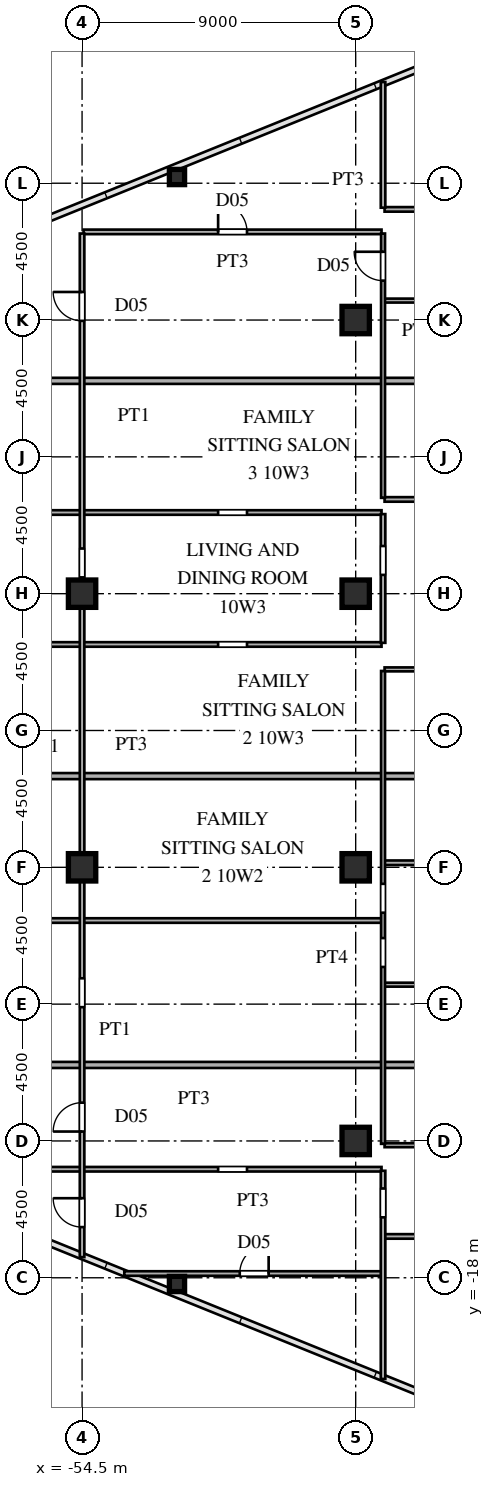
"""IFC4 building model, lengths in metres.
Left out: names, types, materials, properties, quantities, classifications, styles, units other than length and angle.
Written with IfcOpenShell. Run it as: python <this file> out.ifc"""

import sys

from ifc_helpers import new_model, si_unit, direction, frame, frame_2d, origin, origin_2d, place, context, subcontext, project, spatial, rectangle, hollow_rectangle, i_section, extrude, source, transform, mapped, element, fill, save


model = new_model("IFC4")
c1 = context("Model", 3, precision=1e-05, world=origin(), true_north=direction((0.0, 1.0)))
c2 = subcontext(c1, "Body", "Model", "MODEL_VIEW")
j1 = project(units=[si_unit("LENGTHUNIT", "METRE"), si_unit("PLANEANGLEUNIT", "RADIAN")], contexts=[c1])
p1 = place(None, origin())
s1 = spatial("IfcSite", under=j1, at=p1, CompositionType="ELEMENT")
p2 = place(p1, origin())
s2 = spatial("IfcBuilding", under=s1, at=p2, CompositionType="ELEMENT")
p3 = place(p2, frame((0.0, 0.0, 40.5)))
s3 = spatial("IfcBuildingStorey", under=s2, at=p3, CompositionType="ELEMENT", Elevation=40.5)
m1 = source(origin(), c2, "Body", "SweptSolid", [
    extrude(i_section(OverallWidth=0.9, OverallDepth=0.9, WebThickness=0.036, FlangeThickness=0.055, at=origin_2d()), origin(), (0.0, 0.0, 1.0), 3.6),
])
for number, where, z_axis, x_axis in (
    (1, (-45.5, -13.5, 0.0), (0.0, 0.0, 1.0), (1.0, 0.0, 0.0)),
    (2, (-45.5, -4.5, 0.0), (0.0, 0.0, 1.0), (1.0, 0.0, 0.0)),
    (3, (-45.5, 4.5, 0.0), (0.0, 0.0, 1.0), (1.0, 0.0, 0.0)),
    (4, (-45.5, 13.5, 0.0), (0.0, 0.0, 1.0), (1.0, 0.0, 0.0)),
    (5, (-54.5, -4.5, 0.0), (0.0, 0.0, 1.0), (1.0, 0.0, 0.0)),
    (6, (-54.5, 4.5, 0.0), (0.0, 0.0, 1.0), (1.0, 0.0, 0.0)),
):
    element("IfcColumn", number, at=place(p3, frame(where, z_axis=z_axis, x_axis=x_axis)), inside=s3, PredefinedType="COLUMN", context=c2, shape_type="MappedRepresentation", body=[
        mapped(m1, transform((0.0, 0.0, 0.0), scale=1.0)),
    ])
m2 = source(origin(), c2, "Body", "SweptSolid", [
    extrude(hollow_rectangle(XDim=0.5, YDim=0.5, WallThickness=0.02, at=origin_2d()), origin(), (0.0, 0.0, 1.0), 3.6),
])
for number, where, z_axis, x_axis in (
    (7, (-51.378, -18.204, 0.0), (0.0, 0.0, 1.0), (1.0, 0.0, 0.0)),
    (8, (-51.378, 18.204, 0.0), (0.0, 0.0, 1.0), (1.0, 0.0, 0.0)),
):
    element("IfcColumn", number, at=place(p3, frame(where, z_axis=z_axis, x_axis=x_axis)), inside=s3, PredefinedType="COLUMN", context=c2, shape_type="MappedRepresentation", body=[
        mapped(m2, transform((0.0, 0.0, 0.0), scale=1.0)),
    ])
p4 = place(p3, frame((-53.111, -17.86, 0.0), z_axis=(0.0, 0.0, 1.0), x_axis=(1.0, 0.0, 0.0)))
e9 = element("IfcWall", 9, at=p4, inside=s3, PredefinedType="PARTITIONING", context=c2, shape_type="SweptSolid", body=[
    extrude(rectangle(XDim=8.461, YDim=0.15, at=frame_2d((4.23, 0.0))), origin(), (0.0, 0.0, 1.0), 3.38),
])
p5 = place(p4, frame((3.798, 0.0, 0.0)))
e10 = element("IfcOpeningElement", 10, at=p5, cuts=e9, PredefinedType="OPENING", context=c2, shape_type="SweptSolid", body=[
    extrude(rectangle(XDim=0.95, YDim=2.15, at=frame_2d((0.475, 1.075))), frame((0.0, 0.085, 0.0), z_axis=(0.0, -1.0, 0.0), x_axis=(1.0, 0.0, 0.0)), (0.0, 0.0, 1.0), 0.17),
])
p6 = place(p3, frame((-44.55, -16.64, 0.0), z_axis=(0.0, 0.0, 1.0), x_axis=(1.0, 0.0, 0.0)))
e11 = element("IfcWall", 11, at=p6, inside=s3, PredefinedType="PARTITIONING", context=c2, shape_type="SweptSolid", body=[
    extrude(rectangle(XDim=5.55, YDim=0.15, at=frame_2d((2.775, 0.0))), origin(), (0.0, 0.0, 1.0), 3.38),
])
p7 = place(p6, frame((2.3, 0.0, 0.0)))
e12 = element("IfcOpeningElement", 12, at=p7, cuts=e11, PredefinedType="OPENING", context=c2, shape_type="SweptSolid", body=[
    extrude(rectangle(XDim=0.95, YDim=2.15, at=frame_2d((0.475, 1.075))), frame((0.0, 0.085, 0.0), z_axis=(0.0, -1.0, 0.0), x_axis=(1.0, 0.0, 0.0)), (0.0, 0.0, 1.0), 0.17),
])
p8 = place(p3, frame((-61.588, -14.43, 0.0), z_axis=(0.0, 0.0, 1.0), x_axis=(1.0, 0.0, 0.0)))
e13 = element("IfcWall", 13, at=p8, inside=s3, PredefinedType="PARTITIONING", context=c2, shape_type="SweptSolid", body=[
    extrude(rectangle(XDim=16.938, YDim=0.15, at=frame_2d((8.469, 0.0))), origin(), (0.0, 0.0, 1.0), 3.38),
])
p9 = place(p8, frame((11.563, 0.0, 0.0)))
e14 = element("IfcOpeningElement", 14, at=p9, cuts=e13, PredefinedType="OPENING", context=c2, shape_type="SweptSolid", body=[
    extrude(rectangle(XDim=0.95, YDim=2.15, at=frame_2d((0.475, 1.075))), frame((0.0, 0.085, 0.0), z_axis=(0.0, -1.0, 0.0), x_axis=(1.0, 0.0, 0.0)), (0.0, 0.0, 1.0), 0.17),
])
p10 = place(p3, frame((-44.55, -13.64, 0.0), z_axis=(0.0, 0.0, 1.0), x_axis=(1.0, 0.0, 0.0)))
e15 = element("IfcWall", 15, at=p10, inside=s3, PredefinedType="PARTITIONING", context=c2, shape_type="SweptSolid", body=[
    extrude(rectangle(XDim=5.5, YDim=0.13, at=frame_2d((2.75, 0.0))), origin(), (0.0, 0.0, 1.0), 2.68),
])
p11 = place(p10, frame((2.31, 0.0, 0.0)))
e16 = element("IfcOpeningElement", 16, at=p11, cuts=e15, PredefinedType="OPENING", context=c2, shape_type="SweptSolid", body=[
    extrude(rectangle(XDim=0.88, YDim=2.1, at=frame_2d((0.44, 1.05))), frame((0.0, 0.075, 0.0), z_axis=(0.0, -1.0, 0.0), x_axis=(1.0, 0.0, 0.0)), (0.0, 0.0, 1.0), 0.15),
])
p12 = place(p3, frame((-70.043, -11.0, 0.0), z_axis=(0.0, 0.0, 1.0), x_axis=(1.0, 0.0, 0.0)))
e17 = element("IfcWall", 17, at=p12, inside=s3, PredefinedType="PARTITIONING", context=c2, shape_type="SweptSolid", body=[
    extrude(rectangle(XDim=30.963, YDim=0.2, at=frame_2d((15.481, 0.0))), origin(), (0.0, 0.0, 1.0), 3.38),
])
p13 = place(p3, frame((-44.55, -8.36, 0.0), z_axis=(0.0, 0.0, 1.0), x_axis=(1.0, 0.0, 0.0)))
e18 = element("IfcWall", 18, at=p13, inside=s3, PredefinedType="PARTITIONING", context=c2, shape_type="SweptSolid", body=[
    extrude(rectangle(XDim=5.5, YDim=0.13, at=frame_2d((2.75, 0.0))), origin(), (0.0, 0.0, 1.0), 3.38),
])
p14 = place(p13, frame((2.31, 0.0, 0.0)))
e19 = element("IfcOpeningElement", 19, at=p14, cuts=e18, PredefinedType="OPENING", context=c2, shape_type="SweptSolid", body=[
    extrude(rectangle(XDim=0.88, YDim=2.1, at=frame_2d((0.44, 1.05))), frame((0.0, 0.075, 0.0), z_axis=(0.0, -1.0, 0.0), x_axis=(1.0, 0.0, 0.0)), (0.0, 0.0, 1.0), 0.15),
])
p15 = place(p3, frame((-72.535, -6.25, 0.0), z_axis=(0.0, 0.0, 1.0), x_axis=(1.0, 0.0, 0.0)))
e20 = element("IfcWall", 20, at=p15, inside=s3, PredefinedType="PARTITIONING", context=c2, shape_type="SweptSolid", body=[
    extrude(rectangle(XDim=27.885, YDim=0.15, at=frame_2d((13.942, 0.0))), origin(), (0.0, 0.0, 1.0), 3.38),
])
p16 = place(p15, frame((14.71, 0.0, 0.0)))
e21 = element("IfcOpeningElement", 21, at=p16, cuts=e20, PredefinedType="OPENING", context=c2, shape_type="SweptSolid", body=[
    extrude(rectangle(XDim=0.95, YDim=2.15, at=frame_2d((0.475, 1.075))), frame((0.0, 0.085, 0.0), z_axis=(0.0, -1.0, 0.0), x_axis=(1.0, 0.0, 0.0)), (0.0, 0.0, 1.0), 0.17),
])
p17 = place(p3, frame((-44.55, -4.35, 0.0), z_axis=(0.0, 0.0, 1.0), x_axis=(1.0, 0.0, 0.0)))
e22 = element("IfcWall", 22, at=p17, inside=s3, PredefinedType="PARTITIONING", context=c2, shape_type="SweptSolid", body=[
    extrude(rectangle(XDim=5.5, YDim=0.15, at=frame_2d((2.75, 0.0))), origin(), (0.0, 0.0, 1.0), 2.68),
])
p18 = place(p17, frame((2.275, 0.0, 0.0)))
e23 = element("IfcOpeningElement", 23, at=p18, cuts=e22, PredefinedType="OPENING", context=c2, shape_type="SweptSolid", body=[
    extrude(rectangle(XDim=0.95, YDim=2.15, at=frame_2d((0.475, 1.075))), frame((0.0, 0.085, 0.0), z_axis=(0.0, -1.0, 0.0), x_axis=(1.0, 0.0, 0.0)), (0.0, 0.0, 1.0), 0.17),
])
p19 = place(p3, frame((-72.505, -1.5, 0.0), z_axis=(0.0, 0.0, 1.0), x_axis=(1.0, 0.0, 0.0)))
e24 = element("IfcWall", 24, at=p19, inside=s3, PredefinedType="PARTITIONING", context=c2, shape_type="SweptSolid", body=[
    extrude(rectangle(XDim=33.425, YDim=0.2, at=frame_2d((16.712, 0.0))), origin(), (0.0, 0.0, 1.0), 3.38),
])
p20 = place(p3, frame((-44.55, 2.01, 0.0), z_axis=(0.0, 0.0, 1.0), x_axis=(1.0, 0.0, 0.0)))
e25 = element("IfcWall", 25, at=p20, inside=s3, PredefinedType="PARTITIONING", context=c2, shape_type="SweptSolid", body=[
    extrude(rectangle(XDim=5.5, YDim=0.13, at=frame_2d((2.75, 0.0))), origin(), (0.0, 0.0, 1.0), 3.38),
])
p21 = place(p20, frame((2.31, 0.0, 0.0)))
e26 = element("IfcOpeningElement", 26, at=p21, cuts=e25, PredefinedType="OPENING", context=c2, shape_type="SweptSolid", body=[
    extrude(rectangle(XDim=0.88, YDim=2.1, at=frame_2d((0.44, 1.05))), frame((0.0, 0.075, 0.0), z_axis=(0.0, -1.0, 0.0), x_axis=(1.0, 0.0, 0.0)), (0.0, 0.0, 1.0), 0.15),
])
p22 = place(p3, frame((-72.535, 2.83, 0.0), z_axis=(0.0, 0.0, 1.0), x_axis=(1.0, 0.0, 0.0)))
e27 = element("IfcWall", 27, at=p22, inside=s3, PredefinedType="PARTITIONING", context=c2, shape_type="SweptSolid", body=[
    extrude(rectangle(XDim=27.885, YDim=0.15, at=frame_2d((13.942, 0.0))), origin(), (0.0, 0.0, 1.0), 3.38),
])
p23 = place(p22, frame((22.51, 0.0, 0.0)))
e28 = element("IfcOpeningElement", 28, at=p23, cuts=e27, PredefinedType="OPENING", context=c2, shape_type="SweptSolid", body=[
    extrude(rectangle(XDim=0.95, YDim=2.15, at=frame_2d((0.475, 1.075))), frame((0.0, 0.085, 0.0), z_axis=(0.0, -1.0, 0.0), x_axis=(1.0, 0.0, 0.0)), (0.0, 0.0, 1.0), 0.17),
])
p24 = place(p22, frame((14.71, 0.0, 0.0)))
e29 = element("IfcOpeningElement", 29, at=p24, cuts=e27, PredefinedType="OPENING", context=c2, shape_type="SweptSolid", body=[
    extrude(rectangle(XDim=0.95, YDim=2.15, at=frame_2d((0.475, 1.075))), frame((0.0, 0.085, 0.0), z_axis=(0.0, -1.0, 0.0), x_axis=(1.0, 0.0, 0.0)), (0.0, 0.0, 1.0), 0.17),
])
p25 = place(p3, frame((-72.535, 7.17, 0.0), z_axis=(0.0, 0.0, 1.0), x_axis=(1.0, 0.0, 0.0)))
e30 = element("IfcWall", 30, at=p25, inside=s3, PredefinedType="PARTITIONING", context=c2, shape_type="SweptSolid", body=[
    extrude(rectangle(XDim=27.885, YDim=0.15, at=frame_2d((13.942, 0.0))), origin(), (0.0, 0.0, 1.0), 3.38),
])
p26 = place(p25, frame((22.51, 0.0, 0.0)))
e31 = element("IfcOpeningElement", 31, at=p26, cuts=e30, PredefinedType="OPENING", context=c2, shape_type="SweptSolid", body=[
    extrude(rectangle(XDim=0.95, YDim=2.15, at=frame_2d((0.475, 1.075))), frame((0.0, 0.085, 0.0), z_axis=(0.0, -1.0, 0.0), x_axis=(1.0, 0.0, 0.0)), (0.0, 0.0, 1.0), 0.17),
])
p27 = place(p25, frame((14.71, 0.0, 0.0)))
e32 = element("IfcOpeningElement", 32, at=p27, cuts=e30, PredefinedType="OPENING", context=c2, shape_type="SweptSolid", body=[
    extrude(rectangle(XDim=0.95, YDim=2.15, at=frame_2d((0.475, 1.075))), frame((0.0, 0.085, 0.0), z_axis=(0.0, -1.0, 0.0), x_axis=(1.0, 0.0, 0.0)), (0.0, 0.0, 1.0), 0.17),
])
p28 = place(p3, frame((-44.55, 7.6, 0.0), z_axis=(0.0, 0.0, 1.0), x_axis=(1.0, 0.0, 0.0)))
e33 = element("IfcWall", 33, at=p28, inside=s3, PredefinedType="PARTITIONING", context=c2, shape_type="SweptSolid", body=[
    extrude(rectangle(XDim=5.5, YDim=0.15, at=frame_2d((2.75, 0.0))), origin(), (0.0, 0.0, 1.0), 3.38),
])
p29 = place(p28, frame((2.275, 0.0, 0.0)))
e34 = element("IfcOpeningElement", 34, at=p29, cuts=e33, PredefinedType="OPENING", context=c2, shape_type="SweptSolid", body=[
    extrude(rectangle(XDim=0.95, YDim=2.15, at=frame_2d((0.475, 1.075))), frame((0.0, 0.085, 0.0), z_axis=(0.0, -1.0, 0.0), x_axis=(1.0, 0.0, 0.0)), (0.0, 0.0, 1.0), 0.17),
])
p30 = place(p3, frame((-68.807, 11.5, 0.0), z_axis=(0.0, 0.0, 1.0), x_axis=(1.0, 0.0, 0.0)))
e35 = element("IfcWall", 35, at=p30, inside=s3, PredefinedType="PARTITIONING", context=c2, shape_type="SweptSolid", body=[
    extrude(rectangle(XDim=29.727, YDim=0.2, at=frame_2d((14.863, 0.0))), origin(), (0.0, 0.0, 1.0), 3.38),
])
p31 = place(p3, frame((-44.55, 14.14, 0.0), z_axis=(0.0, 0.0, 1.0), x_axis=(1.0, 0.0, 0.0)))
e36 = element("IfcWall", 36, at=p31, inside=s3, PredefinedType="PARTITIONING", context=c2, shape_type="SweptSolid", body=[
    extrude(rectangle(XDim=5.5, YDim=0.13, at=frame_2d((2.75, 0.0))), origin(), (0.0, 0.0, 1.0), 3.38),
])
p32 = place(p31, frame((2.31, 0.0, 0.0)))
e37 = element("IfcOpeningElement", 37, at=p32, cuts=e36, PredefinedType="OPENING", context=c2, shape_type="SweptSolid", body=[
    extrude(rectangle(XDim=0.88, YDim=2.1, at=frame_2d((0.44, 1.05))), frame((0.0, 0.075, 0.0), z_axis=(0.0, -1.0, 0.0), x_axis=(1.0, 0.0, 0.0)), (0.0, 0.0, 1.0), 0.15),
])
p33 = place(p3, frame((-54.45, 16.4, 0.0), z_axis=(0.0, 0.0, 1.0), x_axis=(1.0, 0.0, 0.0)))
e38 = element("IfcWall", 38, at=p33, inside=s3, PredefinedType="PARTITIONING", context=c2, shape_type="SweptSolid", body=[
    extrude(rectangle(XDim=9.8, YDim=0.15, at=frame_2d((4.9, 0.0))), origin(), (0.0, 0.0, 1.0), 3.38),
])
p34 = place(p33, frame((4.425, 0.0, 0.0)))
e39 = element("IfcOpeningElement", 39, at=p34, cuts=e38, PredefinedType="OPENING", context=c2, shape_type="SweptSolid", body=[
    extrude(rectangle(XDim=0.95, YDim=2.15, at=frame_2d((0.475, 1.075))), frame((0.0, 0.085, 0.0), z_axis=(0.0, -1.0, 0.0), x_axis=(1.0, 0.0, 0.0)), (0.0, 0.0, 1.0), 0.17),
])
p35 = place(p3, frame((-44.55, 17.14, 0.0), z_axis=(0.0, 0.0, 1.0), x_axis=(1.0, 0.0, 0.0)))
e40 = element("IfcWall", 40, at=p35, inside=s3, PredefinedType="PARTITIONING", context=c2, shape_type="SweptSolid", body=[
    extrude(rectangle(XDim=5.55, YDim=0.15, at=frame_2d((2.775, 0.0))), origin(), (0.0, 0.0, 1.0), 3.38),
])
p36 = place(p35, frame((2.3, 0.0, 0.0)))
e41 = element("IfcOpeningElement", 41, at=p36, cuts=e40, PredefinedType="OPENING", context=c2, shape_type="SweptSolid", body=[
    extrude(rectangle(XDim=0.95, YDim=2.15, at=frame_2d((0.475, 1.075))), frame((0.0, 0.085, 0.0), z_axis=(0.0, -1.0, 0.0), x_axis=(1.0, 0.0, 0.0)), (0.0, 0.0, 1.0), 0.17),
])
p37 = place(p3, frame((-54.5, -17.321, 0.0), z_axis=(0.0, 0.0, 1.0), x_axis=(0.0, 1.0, 0.0)))
e42 = element("IfcWall", 42, at=p37, inside=s3, PredefinedType="PARTITIONING", context=c2, shape_type="SweptSolid", body=[
    extrude(rectangle(XDim=33.667, YDim=0.15, at=frame_2d((16.833, 0.0))), origin(), (0.0, 0.0, 1.0), 2.68),
])
p38 = place(p37, frame((0.988, 0.0, 0.0)))
e43 = element("IfcOpeningElement", 43, at=p38, cuts=e42, PredefinedType="OPENING", context=c2, shape_type="SweptSolid", body=[
    extrude(rectangle(XDim=0.95, YDim=2.15, at=frame_2d((0.475, 1.075))), frame((0.0, 0.085, 0.0), z_axis=(0.0, -1.0, 0.0), x_axis=(1.0, 0.0, 0.0)), (0.0, 0.0, 1.0), 0.17),
])
p39 = place(p37, frame((4.131, 0.0, 0.0)))
e44 = element("IfcOpeningElement", 44, at=p39, cuts=e42, PredefinedType="OPENING", context=c2, shape_type="SweptSolid", body=[
    extrude(rectangle(XDim=0.95, YDim=2.15, at=frame_2d((0.475, 1.075))), frame((0.0, 0.085, 0.0), z_axis=(0.0, -1.0, 0.0), x_axis=(1.0, 0.0, 0.0)), (0.0, 0.0, 1.0), 0.17),
])
p40 = place(p37, frame((8.221, 0.0, 0.0)))
e45 = element("IfcOpeningElement", 45, at=p40, cuts=e42, PredefinedType="OPENING", context=c2, shape_type="SweptSolid", body=[
    extrude(rectangle(XDim=0.95, YDim=2.15, at=frame_2d((0.475, 1.075))), frame((0.0, 0.085, 0.0), z_axis=(0.0, -1.0, 0.0), x_axis=(1.0, 0.0, 0.0)), (0.0, 0.0, 1.0), 0.17),
])
p41 = place(p37, frame((22.357, 0.0, 0.0)))
e46 = element("IfcOpeningElement", 46, at=p41, cuts=e42, PredefinedType="OPENING", context=c2, shape_type="SweptSolid", body=[
    extrude(rectangle(XDim=0.95, YDim=2.15, at=frame_2d((0.475, 1.075))), frame((0.0, 0.085, 0.0), z_axis=(0.0, -1.0, 0.0), x_axis=(1.0, 0.0, 0.0)), (0.0, 0.0, 1.0), 0.17),
])
p42 = place(p37, frame((30.794, 0.0, 0.0)))
e47 = element("IfcOpeningElement", 47, at=p42, cuts=e42, PredefinedType="OPENING", context=c2, shape_type="SweptSolid", body=[
    extrude(rectangle(XDim=0.95, YDim=2.15, at=frame_2d((0.475, 1.075))), frame((0.0, 0.085, 0.0), z_axis=(0.0, -1.0, 0.0), x_axis=(1.0, 0.0, 0.0)), (0.0, 0.0, 1.0), 0.17),
])
p43 = place(p3, frame((-44.6, -21.328, 0.0), z_axis=(0.0, 0.0, 1.0), x_axis=(0.0, 1.0, 0.0)))
e48 = element("IfcWall", 48, at=p43, inside=s3, PredefinedType="PARTITIONING", context=c2, shape_type="SweptSolid", body=[
    extrude(rectangle(XDim=6.847, YDim=0.15, at=frame_2d((3.423, 0.0))), origin(), (0.0, 0.0, 1.0), 3.38),
])
p44 = place(p43, frame((5.315, 0.0, 0.0)))
e49 = element("IfcOpeningElement", 49, at=p44, cuts=e48, PredefinedType="OPENING", context=c2, shape_type="SweptSolid", body=[
    extrude(rectangle(XDim=0.95, YDim=2.15, at=frame_2d((0.475, 1.075))), frame((0.0, 0.085, 0.0), z_axis=(0.0, -1.0, 0.0), x_axis=(1.0, 0.0, 0.0)), (0.0, 0.0, 1.0), 0.17),
])
p45 = place(p3, frame((-44.6, -13.595, 0.0), z_axis=(0.0, 0.0, 1.0), x_axis=(0.0, 1.0, 0.0)))
e50 = element("IfcWall", 50, at=p45, inside=s3, PredefinedType="PARTITIONING", context=c2, shape_type="SweptSolid", body=[
    extrude(rectangle(XDim=15.553, YDim=0.13, at=frame_2d((7.776, 0.0))), origin(), (0.0, 0.0, 1.0), 3.38),
])
p46 = place(p45, frame((5.817, 0.0, 0.0)))
e51 = element("IfcOpeningElement", 51, at=p46, cuts=e50, PredefinedType="OPENING", context=c2, shape_type="SweptSolid", body=[
    extrude(rectangle(XDim=0.95, YDim=2.15, at=frame_2d((0.475, 1.075))), frame((0.0, 0.075, 0.0), z_axis=(0.0, -1.0, 0.0), x_axis=(1.0, 0.0, 0.0)), (0.0, 0.0, 1.0), 0.15),
])
p47 = place(p45, frame((7.602, 0.0, 0.0)))
e52 = element("IfcOpeningElement", 52, at=p47, cuts=e50, PredefinedType="OPENING", context=c2, shape_type="SweptSolid", body=[
    extrude(rectangle(XDim=0.95, YDim=2.15, at=frame_2d((0.475, 1.075))), frame((0.0, 0.075, 0.0), z_axis=(0.0, -1.0, 0.0), x_axis=(1.0, 0.0, 0.0)), (0.0, 0.0, 1.0), 0.15),
])
p48 = place(p3, frame((-44.6, 2.883, 0.0), z_axis=(0.0, 0.0, 1.0), x_axis=(0.0, 1.0, 0.0)))
e53 = element("IfcWall", 53, at=p48, inside=s3, PredefinedType="PARTITIONING", context=c2, shape_type="SweptSolid", body=[
    extrude(rectangle(XDim=4.234, YDim=0.15, at=frame_2d((2.117, 0.0))), origin(), (0.0, 0.0, 1.0), 3.38),
])
p49 = place(p48, frame((2.235, 0.0, 0.0)))
e54 = element("IfcOpeningElement", 54, at=p49, cuts=e53, PredefinedType="OPENING", context=c2, shape_type="SweptSolid", body=[
    extrude(rectangle(XDim=0.95, YDim=2.15, at=frame_2d((0.475, 1.075))), frame((0.0, 0.085, 0.0), z_axis=(0.0, -1.0, 0.0), x_axis=(1.0, 0.0, 0.0)), (0.0, 0.0, 1.0), 0.17),
])
p50 = place(p3, frame((-44.6, 7.652, 0.0), z_axis=(0.0, 0.0, 1.0), x_axis=(0.0, 1.0, 0.0)))
e55 = element("IfcWall", 55, at=p50, inside=s3, PredefinedType="PARTITIONING", context=c2, shape_type="SweptSolid", body=[
    extrude(rectangle(XDim=8.694, YDim=0.13, at=frame_2d((4.347, 0.0))), origin(), (0.0, 0.0, 1.0), 3.38),
])
p51 = place(p50, frame((7.144, 0.0, 0.0)))
e56 = element("IfcOpeningElement", 56, at=p51, cuts=e55, PredefinedType="OPENING", context=c2, shape_type="SweptSolid", body=[
    extrude(rectangle(XDim=0.95, YDim=2.15, at=frame_2d((0.475, 1.075))), frame((0.0, 0.075, 0.0), z_axis=(0.0, -1.0, 0.0), x_axis=(1.0, 0.0, 0.0)), (0.0, 0.0, 1.0), 0.15),
])
p52 = place(p3, frame((-44.6, 17.195, 0.0), z_axis=(0.0, 0.0, 1.0), x_axis=(0.0, 1.0, 0.0)))
e57 = element("IfcWall", 57, at=p52, inside=s3, PredefinedType="PARTITIONING", context=c2, shape_type="SweptSolid", body=[
    extrude(rectangle(XDim=4.133, YDim=0.15, at=frame_2d((2.066, 0.0))), origin(), (0.0, 0.0, 1.0), 3.38),
])
m3 = source(origin(), c2, "Body", "SweptSolid", [
    extrude(rectangle(XDim=0.95, YDim=2.15, at=frame_2d((0.475, 1.075))), frame((0.0, 0.025, 0.0), z_axis=(0.0, -1.0, 0.0), x_axis=(1.0, 0.0, 0.0)), (0.0, 0.0, 1.0), 0.05),
])
p53 = place(p5, origin())
e58 = element("IfcDoor", 58, at=p53, inside=s3, OperationType="SINGLE_SWING_RIGHT", PredefinedType="DOOR", context=c2, shape_type="MappedRepresentation", body=[
    mapped(m3, transform((0.0, 0.0, 0.0), scale=1.0)),
])
fill(e10, e58)
p54 = place(p34, origin())
e59 = element("IfcDoor", 59, at=p54, inside=s3, OperationType="SINGLE_SWING_LEFT", PredefinedType="DOOR", context=c2, shape_type="MappedRepresentation", body=[
    mapped(m3, transform((0.0, 0.0, 0.0), scale=1.0)),
])
fill(e39, e59)
p55 = place(p38, origin())
e60 = element("IfcDoor", 60, at=p55, inside=s3, OperationType="SINGLE_SWING_RIGHT", PredefinedType="DOOR", context=c2, shape_type="MappedRepresentation", body=[
    mapped(m3, transform((0.0, 0.0, 0.0), scale=1.0)),
])
fill(e43, e60)
p56 = place(p39, origin())
e61 = element("IfcDoor", 61, at=p56, inside=s3, OperationType="SINGLE_SWING_LEFT", PredefinedType="DOOR", context=c2, shape_type="MappedRepresentation", body=[
    mapped(m3, transform((0.0, 0.0, 0.0), scale=1.0)),
])
fill(e44, e61)
p57 = place(p42, origin())
e62 = element("IfcDoor", 62, at=p57, inside=s3, OperationType="SINGLE_SWING_RIGHT", PredefinedType="DOOR", context=c2, shape_type="MappedRepresentation", body=[
    mapped(m3, transform((0.0, 0.0, 0.0), scale=1.0)),
])
fill(e47, e62)
p58 = place(p51, origin())
e63 = element("IfcDoor", 63, at=p58, inside=s3, OperationType="SINGLE_SWING_RIGHT", PredefinedType="DOOR", context=c2, shape_type="MappedRepresentation", body=[
    mapped(m3, transform((0.0, 0.0, 0.0), scale=1.0)),
])
fill(e56, e63)
save(model, sys.argv[1])
